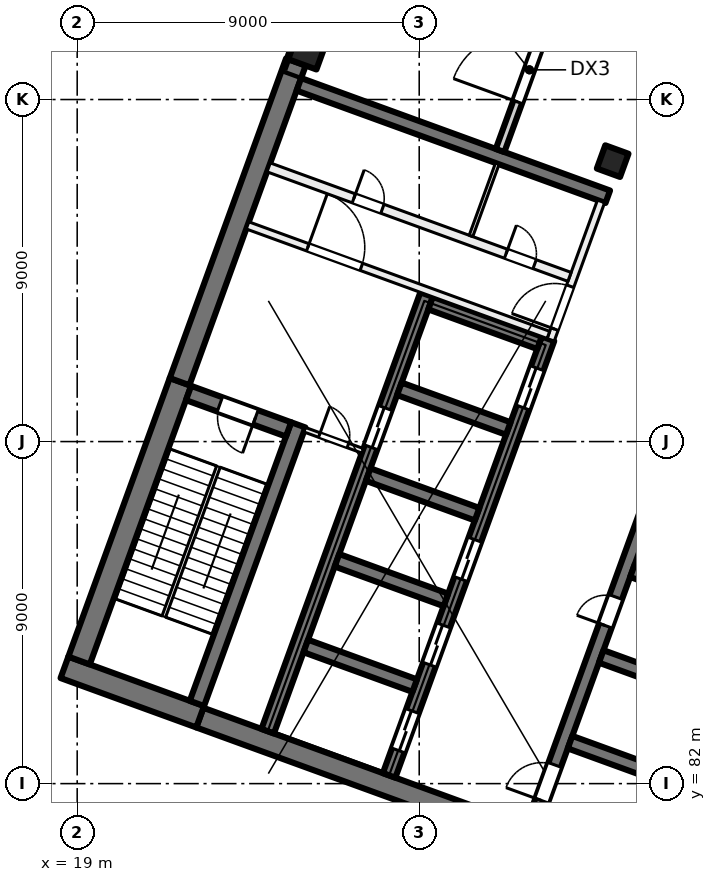
"""IFC4 building model, lengths in metres.
Left out: names, types, materials, properties, quantities, classifications, styles, units other than length and angle.
Written with IfcOpenShell. Run it as: python <this file> out.ifc"""

import sys

from ifc_helpers import new_model, si_unit, direction, frame, frame_2d, origin, origin_2d, place, context, subcontext, project, spatial, rectangle, extrude, element, fill, save


model = new_model("IFC4")
c1 = context("Model", 3, precision=1e-05, world=origin(), true_north=direction((0.0, 1.0)))
c2 = subcontext(c1, "Body", "Model", "MODEL_VIEW")
j1 = project(units=[si_unit("LENGTHUNIT", "METRE"), si_unit("PLANEANGLEUNIT", "RADIAN")], contexts=[c1])
p1 = place(None, origin())
s1 = spatial("IfcSite", under=j1, at=p1, CompositionType="ELEMENT")
p2 = place(p1, origin())
s2 = spatial("IfcBuilding", under=s1, at=p2, CompositionType="ELEMENT")
p3 = place(p2, frame((0.0, 0.0, 182.5)))
s3 = spatial("IfcBuildingStorey", under=s2, at=p3, CompositionType="ELEMENT", Elevation=182.5)
p4 = place(p3, frame((33.091, 98.379, 0.0), z_axis=(0.0, 0.0, 1.0), x_axis=(-0.342020143326, -0.939692620786, 0.0)))
e1 = element("IfcColumn", 1, at=p4, inside=s3, PredefinedType="COLUMN", context=c2, shape_type="SweptSolid", body=[
    extrude(rectangle(XDim=0.65, YDim=0.65, at=origin_2d()), origin(), (0.0, 0.0, 1.0), 5.5),
])
p5 = place(p3, frame((25.056, 101.303, 0.0), z_axis=(0.0, 0.0, 1.0), x_axis=(-0.342020143326, -0.939692620786, 0.0)))
e2 = element("IfcColumn", 2, at=p5, inside=s3, PredefinedType="COLUMN", context=c2, shape_type="SweptSolid", body=[
    extrude(rectangle(XDim=0.8, YDim=0.8, at=origin_2d()), origin(), (0.0, 0.0, 1.0), 5.5),
])
p6 = place(p3, frame((35.759, 78.811, 0.0), z_axis=(0.0, 0.0, 1.0), x_axis=(-0.939692894512, 0.342019391267, 0.0)))
e3 = element("IfcWall", 3, at=p6, inside=s3, PredefinedType="SHEAR", context=c2, shape_type="SweptSolid", body=[
    extrude(rectangle(XDim=14.4, YDim=0.55, at=frame_2d((7.2, 0.0))), origin(), (0.0, 0.0, 1.0), 5.5),
])
p7 = place(p3, frame((22.236, 83.76, 0.0), z_axis=(0.0, 0.0, 1.0), x_axis=(-0.939680822529, 0.342052557032, 0.0)))
e4 = element("IfcWall", 4, at=p7, inside=s3, PredefinedType="SHEAR", context=c2, shape_type="SweptSolid", body=[
    extrude(rectangle(XDim=3.8, YDim=0.6, at=frame_2d((1.9, 0.0))), origin(), (0.0, 0.0, 1.0), 5.5),
])
p8 = place(p3, frame((19.05, 85.239, 0.0), z_axis=(0.0, 0.0, 1.0), x_axis=(0.342016982193, 0.939693771338, 0.0)))
e5 = element("IfcWall", 5, at=p8, inside=s3, PredefinedType="SHEAR", context=c2, shape_type="SweptSolid", body=[
    extrude(rectangle(XDim=7.8, YDim=0.6, at=frame_2d((3.9, 0.0))), origin(), (0.0, 0.0, 1.0), 5.5),
])
p9 = place(p3, frame((21.694, 92.577, 0.0), z_axis=(0.0, 0.0, 1.0), x_axis=(0.342010253184, 0.939696220444, 0.0)))
e6 = element("IfcWall", 6, at=p9, inside=s3, PredefinedType="SHEAR", context=c2, shape_type="SweptSolid", body=[
    extrude(rectangle(XDim=8.95, YDim=0.55, at=frame_2d((4.475, 0.0))), origin(), (0.0, 0.0, 1.0), 5.5),
])
p10 = place(p3, frame((22.15, 84.11, 0.0), z_axis=(0.0, 0.0, 1.0), x_axis=(0.342016982193, 0.939693771338, 0.0)))
e7 = element("IfcWall", 7, at=p10, inside=s3, PredefinedType="SHEAR", context=c2, shape_type="SweptSolid", body=[
    extrude(rectangle(XDim=7.8, YDim=0.4, at=frame_2d((3.9, 0.0))), origin(), (0.0, 0.0, 1.0), 5.5),
])
p11 = place(p3, frame((24.562, 91.32, 0.0), z_axis=(0.0, 0.0, 1.0), x_axis=(-0.939717030584, 0.341953070509, 0.0)))
e8 = element("IfcWall", 8, at=p11, inside=s3, PredefinedType="SHEAR", context=c2, shape_type="SweptSolid", body=[
    extrude(rectangle(XDim=2.8, YDim=0.4, at=frame_2d((1.4, 0.0))), origin(), (0.0, 0.0, 1.0), 5.5),
])
p12 = place(p11, frame((0.925, 0.0, 0.0)))
e9 = element("IfcOpeningElement", 9, at=p12, cuts=e8, PredefinedType="OPENING", context=c2, shape_type="SweptSolid", body=[
    extrude(rectangle(XDim=1.0, YDim=2.1, at=frame_2d((0.5, 1.05))), frame((0.0, 0.21, 0.0), z_axis=(0.0, -1.0, 0.0), x_axis=(1.0, 0.0, 0.0)), (0.0, 0.0, 1.0), 0.42),
])
p13 = place(p3, frame((30.967, 80.848, 0.0), z_axis=(0.0, 0.0, 1.0), x_axis=(0.34201563943, 0.939694260058, 0.0)))
e10 = element("IfcWall", 10, at=p13, inside=s3, PredefinedType="SHEAR", context=c2, shape_type="SweptSolid", body=[
    extrude(rectangle(XDim=12.225, YDim=0.35, at=frame_2d((6.113, 0.0))), origin(), (0.0, 0.0, 1.0), 5.5),
])
p14 = place(p13, frame((0.75, 0.0, 0.0)))
e11 = element("IfcOpeningElement", 11, at=p14, cuts=e10, PredefinedType="OPENING", context=c2, shape_type="SweptSolid", body=[
    extrude(rectangle(XDim=1.0, YDim=2.1, at=frame_2d((0.5, 1.05))), frame((0.0, 0.185, 0.0), z_axis=(0.0, -1.0, 0.0), x_axis=(1.0, 0.0, 0.0)), (0.0, 0.0, 1.0), 0.37),
])
p15 = place(p13, frame((5.65, 0.0, 0.0)))
e12 = element("IfcOpeningElement", 12, at=p15, cuts=e10, PredefinedType="OPENING", context=c2, shape_type="SweptSolid", body=[
    extrude(rectangle(XDim=0.8, YDim=2.1, at=frame_2d((0.4, 1.05))), frame((0.0, 0.185, 0.0), z_axis=(0.0, -1.0, 0.0), x_axis=(1.0, 0.0, 0.0)), (0.0, 0.0, 1.0), 0.37),
])
p16 = place(p3, frame((34.835, 82.047, 0.0), z_axis=(0.0, 0.0, 1.0), x_axis=(-0.939683528043, 0.3420451244, 0.0)))
e13 = element("IfcWall", 13, at=p16, inside=s3, PredefinedType="SHEAR", context=c2, shape_type="SweptSolid", body=[
    extrude(rectangle(XDim=3.05, YDim=0.35, at=frame_2d((1.525, 0.0))), origin(), (0.0, 0.0, 1.0), 5.5),
])
p17 = place(p3, frame((35.656, 84.303, 0.0), z_axis=(0.0, 0.0, 1.0), x_axis=(-0.939709254651, 0.341974438698, 0.0)))
e14 = element("IfcWall", 14, at=p17, inside=s3, PredefinedType="SHEAR", context=c2, shape_type="SweptSolid", body=[
    extrude(rectangle(XDim=3.05, YDim=0.35, at=frame_2d((1.525, 0.0))), origin(), (0.0, 0.0, 1.0), 5.5),
])
p18 = place(p3, frame((36.477, 86.558, 0.0), z_axis=(0.0, 0.0, 1.0), x_axis=(-0.939683528043, 0.3420451244, 0.0)))
e15 = element("IfcWall", 15, at=p18, inside=s3, PredefinedType="SHEAR", context=c2, shape_type="SweptSolid", body=[
    extrude(rectangle(XDim=3.05, YDim=0.35, at=frame_2d((1.525, 0.0))), origin(), (0.0, 0.0, 1.0), 5.5),
])
p19 = place(p3, frame((27.208, 82.216, 0.0), z_axis=(0.0, 0.0, 1.0), x_axis=(0.34201563943, 0.939694260058, 0.0)))
e16 = element("IfcWall", 16, at=p19, inside=s3, PredefinedType="SHEAR", context=c2, shape_type="SweptSolid", body=[
    extrude(rectangle(XDim=12.225, YDim=0.35, at=frame_2d((6.113, 0.0))), origin(), (0.0, 0.0, 1.0), 5.5),
])
p20 = place(p19, frame((0.7, 0.0, 0.0)))
e17 = element("IfcOpeningElement", 17, at=p20, cuts=e16, PredefinedType="OPENING", context=c2, shape_type="SweptSolid", body=[
    extrude(rectangle(XDim=1.1, YDim=2.1, at=frame_2d((0.55, 1.05))), frame((0.0, 0.185, 0.0), z_axis=(0.0, -1.0, 0.0), x_axis=(1.0, 0.0, 0.0)), (0.0, 0.0, 1.0), 0.37),
])
p21 = place(p19, frame((3.1, 0.0, 0.0)))
e18 = element("IfcOpeningElement", 18, at=p21, cuts=e16, PredefinedType="OPENING", context=c2, shape_type="SweptSolid", body=[
    extrude(rectangle(XDim=1.1, YDim=2.1, at=frame_2d((0.55, 1.05))), frame((0.0, 0.185, 0.0), z_axis=(0.0, -1.0, 0.0), x_axis=(1.0, 0.0, 0.0)), (0.0, 0.0, 1.0), 0.37),
])
p22 = place(p19, frame((5.5, 0.0, 0.0)))
e19 = element("IfcOpeningElement", 19, at=p22, cuts=e16, PredefinedType="OPENING", context=c2, shape_type="SweptSolid", body=[
    extrude(rectangle(XDim=1.1, YDim=2.1, at=frame_2d((0.55, 1.05))), frame((0.0, 0.185, 0.0), z_axis=(0.0, -1.0, 0.0), x_axis=(1.0, 0.0, 0.0)), (0.0, 0.0, 1.0), 0.37),
])
p23 = place(p19, frame((10.3, 0.0, 0.0)))
e20 = element("IfcOpeningElement", 20, at=p23, cuts=e16, PredefinedType="OPENING", context=c2, shape_type="SweptSolid", body=[
    extrude(rectangle(XDim=1.1, YDim=2.1, at=frame_2d((0.55, 1.05))), frame((0.0, 0.185, 0.0), z_axis=(0.0, -1.0, 0.0), x_axis=(1.0, 0.0, 0.0)), (0.0, 0.0, 1.0), 0.37),
])
p24 = place(p3, frame((24.013, 83.379, 0.0), z_axis=(0.0, 0.0, 1.0), x_axis=(0.34201563943, 0.939694260058, 0.0)))
e21 = element("IfcWall", 21, at=p24, inside=s3, PredefinedType="SHEAR", context=c2, shape_type="SweptSolid", body=[
    extrude(rectangle(XDim=12.225, YDim=0.35, at=frame_2d((6.113, 0.0))), origin(), (0.0, 0.0, 1.0), 5.5),
])
p25 = place(p24, frame((7.95, 0.0, 0.0)))
e22 = element("IfcOpeningElement", 22, at=p25, cuts=e21, PredefinedType="OPENING", context=c2, shape_type="SweptSolid", body=[
    extrude(rectangle(XDim=1.1, YDim=2.1, at=frame_2d((0.55, 1.05))), frame((0.0, 0.185, 0.0), z_axis=(0.0, -1.0, 0.0), x_axis=(1.0, 0.0, 0.0)), (0.0, 0.0, 1.0), 0.37),
])
for number, where, z_axis, x_axis in (
    (23, (27.881, 84.578, 0.0), (0.0, 0.0, 1.0), (-0.94, 0.342, 0.0)),
    (24, (28.702, 86.833, 0.0), (0.0, 0.0, 1.0), (-0.94, 0.342, 0.0)),
    (25, (29.523, 89.089, 0.0), (0.0, 0.0, 1.0), (-0.94, 0.342, 0.0)),
):
    element("IfcWall", number, at=place(p3, frame(where, z_axis=z_axis, x_axis=x_axis)), inside=s3, PredefinedType="SHEAR", context=c2, shape_type="SweptSolid", body=[
        extrude(rectangle(XDim=3.05, YDim=0.35, at=frame_2d((1.525, 0.0))), origin(), (0.0, 0.0, 1.0), 5.5),
    ])
p26 = place(p3, frame((30.344, 91.344, 0.0), z_axis=(0.0, 0.0, 1.0), x_axis=(-0.939709254651, 0.341974438698, 0.0)))
e26 = element("IfcWall", 26, at=p26, inside=s3, PredefinedType="SHEAR", context=c2, shape_type="SweptSolid", body=[
    extrude(rectangle(XDim=3.05, YDim=0.35, at=frame_2d((1.525, 0.0))), origin(), (0.0, 0.0, 1.0), 5.5),
])
p27 = place(p3, frame((31.165, 93.599, 0.0), z_axis=(0.0, 0.0, 1.0), x_axis=(-0.939683528043, 0.3420451244, 0.0)))
e27 = element("IfcWall", 27, at=p27, inside=s3, PredefinedType="SHEAR", context=c2, shape_type="SweptSolid", body=[
    extrude(rectangle(XDim=3.05, YDim=0.35, at=frame_2d((1.525, 0.0))), origin(), (0.0, 0.0, 1.0), 5.5),
])
p28 = place(p3, frame((32.962, 97.441, 0.0), z_axis=(0.0, 0.0, 1.0), x_axis=(-0.939689545667, 0.342028592028, 0.0)))
e28 = element("IfcWall", 28, at=p28, inside=s3, PredefinedType="SHEAR", context=c2, shape_type="SweptSolid", body=[
    extrude(rectangle(XDim=8.65, YDim=0.35, at=frame_2d((4.325, 0.0))), origin(), (0.0, 0.0, 1.0), 5.5),
])
p29 = place(p3, frame((30.128, 98.659, 0.0), z_axis=(0.0, 0.0, 1.0), x_axis=(0.342038159768, 0.939686063142, 0.0)))
e29 = element("IfcWall", 29, at=p29, inside=s3, PredefinedType="SOLIDWALL", context=c2, shape_type="SweptSolid", body=[
    extrude(rectangle(XDim=4.517, YDim=0.24, at=frame_2d((2.258, 0.0))), origin(), (0.0, 0.0, 1.0), 5.125),
])
p30 = place(p29, frame((1.358, 0.0, 0.0)))
e30 = element("IfcOpeningElement", 30, at=p30, cuts=e29, PredefinedType="OPENING", context=c2, shape_type="SweptSolid", body=[
    extrude(rectangle(XDim=1.8, YDim=2.4, at=frame_2d((0.9, 1.2))), frame((0.0, 0.13, 0.0), z_axis=(0.0, -1.0, 0.0), x_axis=(1.0, 0.0, 0.0)), (0.0, 0.0, 1.0), 0.26),
])
p31 = place(p3, frame((31.459, 93.678, 0.0), z_axis=(0.0, 0.0, 1.0), x_axis=(0.341985870128, 0.939705094502, 0.0)))
e31 = element("IfcWall", 31, at=p31, inside=s3, PredefinedType="PARTITIONING", context=c2, shape_type="SweptSolid", body=[
    extrude(rectangle(XDim=3.875, YDim=0.2, at=frame_2d((1.938, 0.0))), origin(), (0.0, 0.0, 1.0), 5.125),
])
p32 = place(p31, frame((0.3, 0.0, 0.0)))
e32 = element("IfcOpeningElement", 32, at=p32, cuts=e31, PredefinedType="OPENING", context=c2, shape_type="SweptSolid", body=[
    extrude(rectangle(XDim=1.2, YDim=2.1, at=frame_2d((0.6, 1.05))), frame((0.0, 0.11, 0.0), z_axis=(0.0, -1.0, 0.0), x_axis=(1.0, 0.0, 0.0)), (0.0, 0.0, 1.0), 0.22),
])
p33 = place(p3, frame((23.483, 96.688, 0.0), z_axis=(0.0, 0.0, 1.0), x_axis=(0.939691007314, -0.342024576271, 0.0)))
e33 = element("IfcWall", 33, at=p33, inside=s3, PredefinedType="PARTITIONING", context=c2, shape_type="SweptSolid", body=[
    extrude(rectangle(XDim=8.425, YDim=0.2, at=frame_2d((4.212, 0.0))), origin(), (0.0, 0.0, 1.0), 5.125),
])
p34 = place(p33, frame((1.688, 0.0, 0.0)))
e34 = element("IfcOpeningElement", 34, at=p34, cuts=e33, PredefinedType="OPENING", context=c2, shape_type="SweptSolid", body=[
    extrude(rectangle(XDim=1.5, YDim=2.1, at=frame_2d((0.75, 1.05))), frame((0.0, 0.11, 0.0), z_axis=(0.0, -1.0, 0.0), x_axis=(1.0, 0.0, 0.0)), (0.0, 0.0, 1.0), 0.22),
])
p35 = place(p3, frame((24.039, 98.215, 0.0), z_axis=(0.0, 0.0, 1.0), x_axis=(0.939687617333, -0.342033889887, 0.0)))
e35 = element("IfcWall", 35, at=p35, inside=s3, PredefinedType="PARTITIONING", context=c2, shape_type="SweptSolid", body=[
    extrude(rectangle(XDim=8.425, YDim=0.25, at=frame_2d((4.212, 0.0))), origin(), (0.0, 0.0, 1.0), 5.125),
])
p36 = place(p35, frame((6.647, 0.0, 0.0)))
e36 = element("IfcOpeningElement", 36, at=p36, cuts=e35, PredefinedType="OPENING", context=c2, shape_type="SweptSolid", body=[
    extrude(rectangle(XDim=0.8, YDim=2.1, at=frame_2d((0.4, 1.05))), frame((0.0, 0.135, 0.0), z_axis=(0.0, -1.0, 0.0), x_axis=(1.0, 0.0, 0.0)), (0.0, 0.0, 1.0), 0.27),
])
p37 = place(p35, frame((2.385, 0.0, 0.0)))
e37 = element("IfcOpeningElement", 37, at=p37, cuts=e35, PredefinedType="OPENING", context=c2, shape_type="SweptSolid", body=[
    extrude(rectangle(XDim=0.8, YDim=2.1, at=frame_2d((0.4, 1.05))), frame((0.0, 0.135, 0.0), z_axis=(0.0, -1.0, 0.0), x_axis=(1.0, 0.0, 0.0)), (0.0, 0.0, 1.0), 0.27),
])
p38 = place(p3, frame((24.985, 91.312, 0.0), z_axis=(0.0, 0.0, 1.0), x_axis=(0.939705651352, -0.341984340019, 0.0)))
e38 = element("IfcWall", 38, at=p38, inside=s3, PredefinedType="PARTITIONING", context=c2, shape_type="SweptSolid", body=[
    extrude(rectangle(XDim=1.625, YDim=0.125, at=frame_2d((0.812, 0.0))), origin(), (0.0, 0.0, 1.0), 5.125),
])
p39 = place(p38, frame((0.413, 0.0, 0.0)))
e39 = element("IfcOpeningElement", 39, at=p39, cuts=e38, PredefinedType="OPENING", context=c2, shape_type="SweptSolid", body=[
    extrude(rectangle(XDim=0.8, YDim=2.1, at=frame_2d((0.4, 1.05))), frame((0.0, 0.073, 0.0), z_axis=(0.0, -1.0, 0.0), x_axis=(1.0, 0.0, 0.0)), (0.0, 0.0, 1.0), 0.145),
])
p40 = place(p3, frame((29.362, 96.41, 0.0), z_axis=(0.0, 0.0, 1.0), x_axis=(0.342043138314, 0.939684250976, 0.0)))
e40 = element("IfcWall", 40, at=p40, inside=s3, PredefinedType="PARTITIONING", context=c2, shape_type="SweptSolid", body=[
    extrude(rectangle(XDim=2.025, YDim=0.1, at=frame_2d((1.012, 0.0))), origin(), (0.0, 0.0, 1.0), 5.125),
])
p41 = place(p30, origin())
e41 = element("IfcDoor", 41, at=p41, inside=s3, OperationType="DOUBLE_DOOR_SINGLE_SWING", PredefinedType="DOOR", context=c2, shape_type="SweptSolid", body=[
    extrude(rectangle(XDim=1.8, YDim=2.4, at=frame_2d((0.9, 1.2))), frame((0.0, 0.025, 0.0), z_axis=(0.0, -1.0, 0.0), x_axis=(1.0, 0.0, 0.0)), (0.0, 0.0, 1.0), 0.05),
])
fill(e30, e41)
p42 = place(p20, origin())
e42 = element("IfcDoor", 42, at=p42, inside=s3, OperationType="DOUBLE_DOOR_SLIDING", PredefinedType="DOOR", context=c2, shape_type="SweptSolid", body=[
    extrude(rectangle(XDim=1.1, YDim=2.1, at=frame_2d((0.55, 1.05))), frame((0.0, 0.025, 0.0), z_axis=(0.0, -1.0, 0.0), x_axis=(1.0, 0.0, 0.0)), (0.0, 0.0, 1.0), 0.05),
])
fill(e17, e42)
p43 = place(p21, origin())
e43 = element("IfcDoor", 43, at=p43, inside=s3, OperationType="DOUBLE_DOOR_SLIDING", PredefinedType="DOOR", context=c2, shape_type="SweptSolid", body=[
    extrude(rectangle(XDim=1.1, YDim=2.1, at=frame_2d((0.55, 1.05))), frame((0.0, 0.025, 0.0), z_axis=(0.0, -1.0, 0.0), x_axis=(1.0, 0.0, 0.0)), (0.0, 0.0, 1.0), 0.05),
])
fill(e18, e43)
p44 = place(p22, origin())
e44 = element("IfcDoor", 44, at=p44, inside=s3, OperationType="DOUBLE_DOOR_SLIDING", PredefinedType="DOOR", context=c2, shape_type="SweptSolid", body=[
    extrude(rectangle(XDim=1.1, YDim=2.1, at=frame_2d((0.55, 1.05))), frame((0.0, 0.025, 0.0), z_axis=(0.0, -1.0, 0.0), x_axis=(1.0, 0.0, 0.0)), (0.0, 0.0, 1.0), 0.05),
])
fill(e19, e44)
p45 = place(p23, origin())
e45 = element("IfcDoor", 45, at=p45, inside=s3, OperationType="DOUBLE_DOOR_SLIDING", PredefinedType="DOOR", context=c2, shape_type="SweptSolid", body=[
    extrude(rectangle(XDim=1.1, YDim=2.1, at=frame_2d((0.55, 1.05))), frame((0.0, 0.025, 0.0), z_axis=(0.0, -1.0, 0.0), x_axis=(1.0, 0.0, 0.0)), (0.0, 0.0, 1.0), 0.05),
])
fill(e20, e45)
p46 = place(p14, origin())
e46 = element("IfcDoor", 46, at=p46, inside=s3, OperationType="SINGLE_SWING_LEFT", PredefinedType="DOOR", context=c2, shape_type="SweptSolid", body=[
    extrude(rectangle(XDim=1.0, YDim=2.1, at=frame_2d((0.5, 1.05))), frame((0.0, 0.025, 0.0), z_axis=(0.0, -1.0, 0.0), x_axis=(1.0, 0.0, 0.0)), (0.0, 0.0, 1.0), 0.05),
])
fill(e11, e46)
p47 = place(p15, origin())
e47 = element("IfcDoor", 47, at=p47, inside=s3, OperationType="SINGLE_SWING_RIGHT", PredefinedType="DOOR", context=c2, shape_type="SweptSolid", body=[
    extrude(rectangle(XDim=0.8, YDim=2.1, at=frame_2d((0.4, 1.05))), frame((0.0, 0.025, 0.0), z_axis=(0.0, -1.0, 0.0), x_axis=(1.0, 0.0, 0.0)), (0.0, 0.0, 1.0), 0.05),
])
fill(e12, e47)
p48 = place(p32, origin())
e48 = element("IfcDoor", 48, at=p48, inside=s3, OperationType="DOUBLE_DOOR_SINGLE_SWING", PredefinedType="DOOR", context=c2, shape_type="SweptSolid", body=[
    extrude(rectangle(XDim=1.2, YDim=2.1, at=frame_2d((0.6, 1.05))), frame((0.0, 0.025, 0.0), z_axis=(0.0, -1.0, 0.0), x_axis=(1.0, 0.0, 0.0)), (0.0, 0.0, 1.0), 0.05),
])
fill(e32, e48)
p49 = place(p34, origin())
e49 = element("IfcDoor", 49, at=p49, inside=s3, OperationType="DOUBLE_DOOR_SINGLE_SWING", PredefinedType="DOOR", context=c2, shape_type="SweptSolid", body=[
    extrude(rectangle(XDim=1.5, YDim=2.1, at=frame_2d((0.75, 1.05))), frame((0.0, 0.025, 0.0), z_axis=(0.0, -1.0, 0.0), x_axis=(1.0, 0.0, 0.0)), (0.0, 0.0, 1.0), 0.05),
])
fill(e34, e49)
p50 = place(p12, origin())
e50 = element("IfcDoor", 50, at=p50, inside=s3, OperationType="SINGLE_SWING_LEFT", PredefinedType="DOOR", context=c2, shape_type="SweptSolid", body=[
    extrude(rectangle(XDim=1.0, YDim=2.1, at=frame_2d((0.5, 1.05))), frame((0.0, 0.025, 0.0), z_axis=(0.0, -1.0, 0.0), x_axis=(1.0, 0.0, 0.0)), (0.0, 0.0, 1.0), 0.05),
])
fill(e9, e50)
p51 = place(p39, origin())
e51 = element("IfcDoor", 51, at=p51, inside=s3, OperationType="SINGLE_SWING_RIGHT", PredefinedType="DOOR", context=c2, shape_type="SweptSolid", body=[
    extrude(rectangle(XDim=0.8, YDim=2.1, at=frame_2d((0.4, 1.05))), frame((0.0, 0.025, 0.0), z_axis=(0.0, -1.0, 0.0), x_axis=(1.0, 0.0, 0.0)), (0.0, 0.0, 1.0), 0.05),
])
fill(e39, e51)
p52 = place(p36, origin())
e52 = element("IfcDoor", 52, at=p52, inside=s3, OperationType="SINGLE_SWING_LEFT", PredefinedType="DOOR", context=c2, shape_type="SweptSolid", body=[
    extrude(rectangle(XDim=0.8, YDim=2.1, at=frame_2d((0.4, 1.05))), frame((0.0, 0.025, 0.0), z_axis=(0.0, -1.0, 0.0), x_axis=(1.0, 0.0, 0.0)), (0.0, 0.0, 1.0), 0.05),
])
fill(e36, e52)
p53 = place(p37, origin())
e53 = element("IfcDoor", 53, at=p53, inside=s3, OperationType="SINGLE_SWING_RIGHT", PredefinedType="DOOR", context=c2, shape_type="SweptSolid", body=[
    extrude(rectangle(XDim=0.8, YDim=2.1, at=frame_2d((0.4, 1.05))), frame((0.0, 0.025, 0.0), z_axis=(0.0, -1.0, 0.0), x_axis=(1.0, 0.0, 0.0)), (0.0, 0.0, 1.0), 0.05),
])
fill(e37, e53)
p54 = place(p25, origin())
e54 = element("IfcDoor", 54, at=p54, inside=s3, OperationType="DOUBLE_DOOR_SLIDING", PredefinedType="DOOR", context=c2, shape_type="SweptSolid", body=[
    extrude(rectangle(XDim=1.1, YDim=2.1, at=frame_2d((0.55, 1.05))), frame((0.0, 0.025, 0.0), z_axis=(0.0, -1.0, 0.0), x_axis=(1.0, 0.0, 0.0)), (0.0, 0.0, 1.0), 0.05),
])
fill(e22, e54)
save(model, sys.argv[1])
